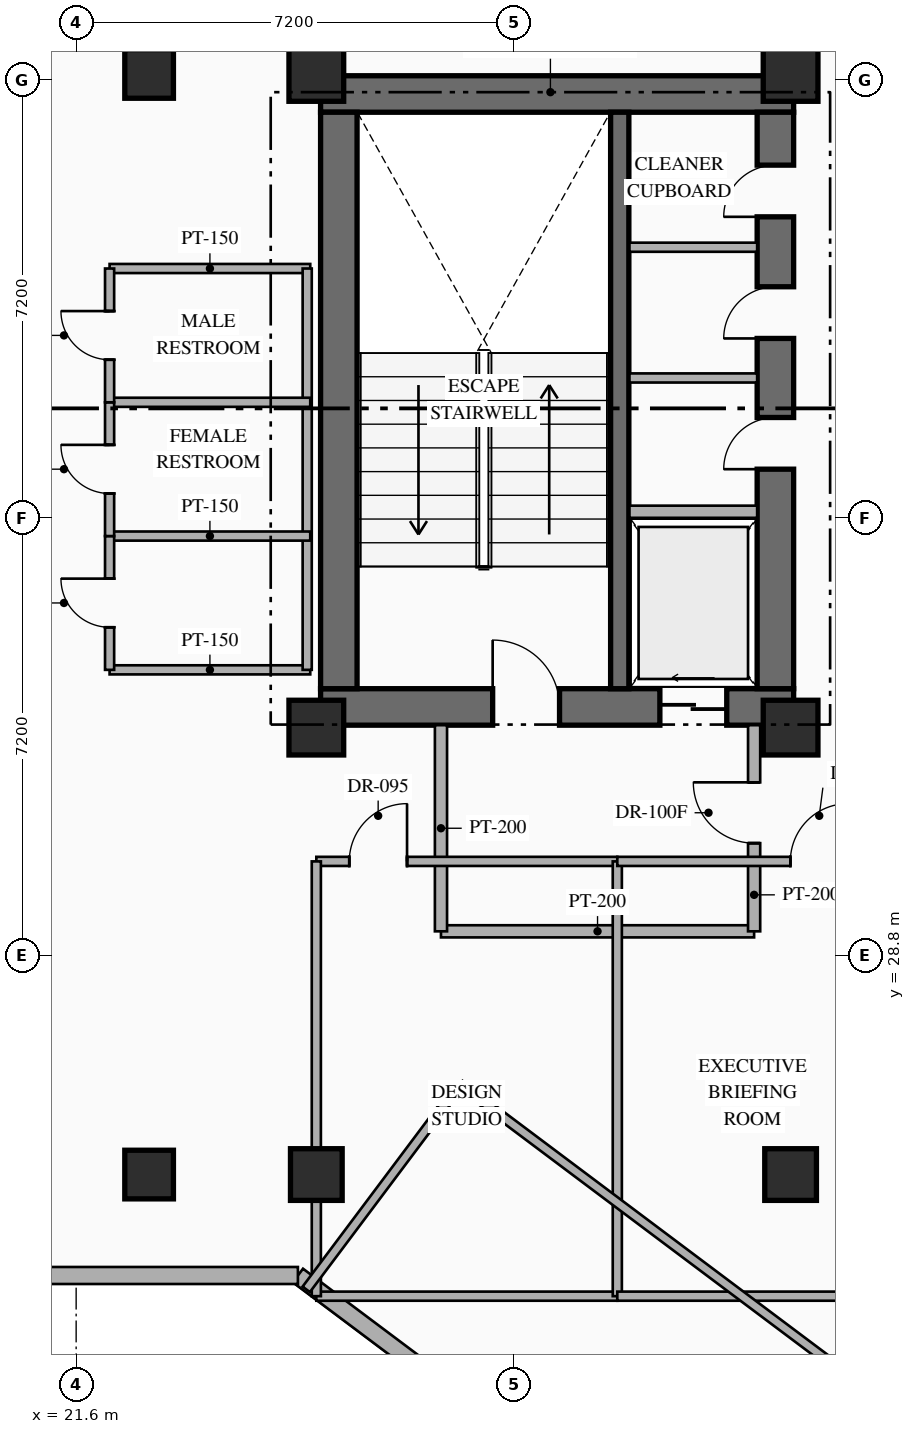
"""IFC4 building model, lengths in metres.
Left out: names, types, materials, properties, quantities, classifications, styles, units other than length and angle.
Written with IfcOpenShell. Run it as: python <this file> out.ifc"""

import sys

from ifc_helpers import new_model, si_unit, direction, frame, frame_2d, origin, origin_2d, place, context, subcontext, project, spatial, rectangle, hollow_rectangle, extrude, element, fill, save


model = new_model("IFC4")
c1 = context("Model", 3, precision=1e-05, world=origin(), true_north=direction((0.0, 1.0)))
c2 = subcontext(c1, "Body", "Model", "MODEL_VIEW")
j1 = project(units=[si_unit("LENGTHUNIT", "METRE"), si_unit("PLANEANGLEUNIT", "RADIAN")], contexts=[c1])
p1 = place(None, origin())
s1 = spatial("IfcSite", under=j1, at=p1, CompositionType="ELEMENT")
p2 = place(p1, origin())
s2 = spatial("IfcBuilding", under=s1, at=p2, CompositionType="ELEMENT")
p3 = place(p2, frame((0.0, 0.0, 160.05)))
s3 = spatial("IfcBuildingStorey", under=s2, at=p3, CompositionType="ELEMENT", Elevation=160.05)
p4 = place(p3, frame((25.62, 32.89, 0.0), z_axis=(0.0, 0.0, 1.0), x_axis=(1.0, 0.0, 0.0)))
e1 = element("IfcWall", 1, at=p4, inside=s3, PredefinedType="SHEAR", context=c2, shape_type="SweptSolid", body=[
    extrude(rectangle(XDim=7.78, YDim=0.6, at=frame_2d((3.89, 0.0))), origin(), (0.0, 0.0, 1.0), 3.6),
])
p5 = place(p4, frame((2.83, 0.0, 0.0)))
e2 = element("IfcOpeningElement", 2, at=p5, cuts=e1, PredefinedType="OPENING", context=c2, shape_type="SweptSolid", body=[
    extrude(rectangle(XDim=1.1, YDim=2.2, at=frame_2d((0.55, 1.1))), frame((0.0, 0.31, 0.0), z_axis=(0.0, -1.0, 0.0), x_axis=(1.0, 0.0, 0.0)), (0.0, 0.0, 1.0), 0.62),
])
p6 = place(p4, frame((5.58, 0.0, 0.0)))
e3 = element("IfcOpeningElement", 3, at=p6, cuts=e1, PredefinedType="OPENING", context=c2, shape_type="SweptSolid", body=[
    extrude(rectangle(XDim=1.1, YDim=2.15, at=frame_2d((0.55, 1.075))), frame((0.0, 0.31, 0.0), z_axis=(0.0, -1.0, 0.0), x_axis=(1.0, 0.0, 0.0)), (0.0, 0.0, 1.0), 0.62),
])
p7 = place(p3, frame((25.62, 42.97, 0.0), z_axis=(0.0, 0.0, 1.0), x_axis=(1.0, 0.0, 0.0)))
e4 = element("IfcWall", 4, at=p7, inside=s3, PredefinedType="SHEAR", context=c2, shape_type="SweptSolid", body=[
    extrude(rectangle(XDim=7.78, YDim=0.6, at=frame_2d((3.89, 0.0))), origin(), (0.0, 0.0, 1.0), 3.6),
])
p8 = place(p3, frame((25.92, 33.19, 0.0), z_axis=(0.0, 0.0, 1.0), x_axis=(0.0, 1.0, 0.0)))
e5 = element("IfcWall", 5, at=p8, inside=s3, PredefinedType="SHEAR", context=c2, shape_type="SweptSolid", body=[
    extrude(rectangle(XDim=9.48, YDim=0.6, at=frame_2d((4.74, 0.0))), origin(), (0.0, 0.0, 1.0), 3.6),
])
p9 = place(p3, frame((33.1, 33.19, 0.0), z_axis=(0.0, 0.0, 1.0), x_axis=(0.0, 1.0, 0.0)))
e6 = element("IfcWall", 6, at=p9, inside=s3, PredefinedType="SHEAR", context=c2, shape_type="SweptSolid", body=[
    extrude(rectangle(XDim=9.48, YDim=0.6, at=frame_2d((4.74, 0.0))), origin(), (0.0, 0.0, 1.0), 3.6),
])
p10 = place(p9, frame((3.61, 0.0, 0.0)))
e7 = element("IfcOpeningElement", 7, at=p10, cuts=e6, PredefinedType="OPENING", context=c2, shape_type="SweptSolid", body=[
    extrude(rectangle(XDim=0.85, YDim=2.08, at=frame_2d((0.425, 1.04))), frame((0.0, 0.31, 0.0), z_axis=(0.0, -1.0, 0.0), x_axis=(1.0, 0.0, 0.0)), (0.0, 0.0, 1.0), 0.62),
])
p11 = place(p9, frame((5.76, 0.0, 0.0)))
e8 = element("IfcOpeningElement", 8, at=p11, cuts=e6, PredefinedType="OPENING", context=c2, shape_type="SweptSolid", body=[
    extrude(rectangle(XDim=0.85, YDim=2.08, at=frame_2d((0.425, 1.04))), frame((0.0, 0.31, 0.0), z_axis=(0.0, -1.0, 0.0), x_axis=(1.0, 0.0, 0.0)), (0.0, 0.0, 1.0), 0.62),
])
p12 = place(p9, frame((7.76, 0.0, 0.0)))
e9 = element("IfcOpeningElement", 9, at=p12, cuts=e6, PredefinedType="OPENING", context=c2, shape_type="SweptSolid", body=[
    extrude(rectangle(XDim=0.85, YDim=2.08, at=frame_2d((0.425, 1.04))), frame((0.0, 0.31, 0.0), z_axis=(0.0, -1.0, 0.0), x_axis=(1.0, 0.0, 0.0)), (0.0, 0.0, 1.0), 0.62),
])
p13 = place(p3, frame((30.54, 33.19, 0.0), z_axis=(0.0, 0.0, 1.0), x_axis=(0.0, 1.0, 0.0)))
e10 = element("IfcWall", 10, at=p13, inside=s3, PredefinedType="SHEAR", context=c2, shape_type="SweptSolid", body=[
    extrude(rectangle(XDim=9.48, YDim=0.3, at=frame_2d((4.74, 0.0))), origin(), (0.0, 0.0, 1.0), 3.6),
])
for number, where, z_axis, x_axis in (
    (11, (25.55, 32.55, 0.0), (0.0, 0.0, 1.0), (1.0, 0.0, 0.0)),
    (12, (33.35, 32.55, 0.0), (0.0, 0.0, 1.0), (1.0, 0.0, 0.0)),
    (13, (25.55, 43.3, 0.0), (0.0, 0.0, 1.0), (1.0, 0.0, 0.0)),
    (14, (33.35, 43.3, 0.0), (0.0, 0.0, 1.0), (1.0, 0.0, 0.0)),
):
    element("IfcColumn", number, at=place(p3, frame(where, z_axis=z_axis, x_axis=x_axis)), inside=s3, PredefinedType="COLUMN", context=c2, shape_type="SweptSolid", body=[
        extrude(rectangle(XDim=0.9, YDim=0.9, at=origin_2d()), origin(), (0.0, 0.0, 1.0), 3.6),
    ])
for number, where, z_axis, x_axis in (
    (15, (25.55, 25.2, 0.0), (0.0, 0.0, 1.0), (1.0, 0.0, 0.0)),
    (16, (33.35, 25.2, 0.0), (0.0, 0.0, 1.0), (1.0, 0.0, 0.0)),
):
    element("IfcColumn", number, at=place(p3, frame(where, z_axis=z_axis, x_axis=x_axis)), inside=s3, PredefinedType="COLUMN", context=c2, shape_type="SweptSolid", body=[
        extrude(hollow_rectangle(XDim=0.85, YDim=0.85, WallThickness=0.032, at=origin_2d()), origin(), (0.0, 0.0, 1.0), 3.6),
    ])
for number, where, z_axis, x_axis in (
    (17, (22.8, 25.2, 0.0), (0.0, 0.0, 1.0), (1.0, 0.0, 0.0)),
    (18, (22.8, 43.3, 0.0), (0.0, 0.0, 1.0), (1.0, 0.0, 0.0)),
):
    element("IfcColumn", number, at=place(p3, frame(where, z_axis=z_axis, x_axis=x_axis)), inside=s3, PredefinedType="COLUMN", context=c2, shape_type="SweptSolid", body=[
        extrude(hollow_rectangle(XDim=0.8, YDim=0.8, WallThickness=0.032, at=origin_2d()), origin(), (0.0, 0.0, 1.0), 3.6),
    ])
p14 = place(p3, frame((44.918, 8.787, 0.0), z_axis=(0.0, 0.0, 1.0), x_axis=(-0.800004765927, 0.599993645378, 0.0)))
e19 = element("IfcWall", 19, at=p14, inside=s3, PredefinedType="STANDARD", context=c2, shape_type="SweptSolid", body=[
    extrude(rectangle(XDim=24.588, YDim=0.28, at=frame_2d((12.294, 0.0))), origin(), (0.0, 0.0, 1.0), 3.35),
])
p15 = place(p3, frame((25.247, 23.54, 0.0), z_axis=(0.0, 0.0, 1.0), x_axis=(-1.0, 0.0, 0.0)))
e20 = element("IfcWall", 20, at=p15, inside=s3, PredefinedType="STANDARD", context=c2, shape_type="SweptSolid", body=[
    extrude(rectangle(XDim=6.747, YDim=0.28, at=frame_2d((3.374, 0.0))), origin(), (0.0, 0.0, 1.0), 3.35),
])
p16 = place(p3, frame((30.7, 36.1, 0.0), z_axis=(0.0, 0.0, 1.0), x_axis=(1.0, 0.0, 0.0)))
e21 = element("IfcWall", 21, at=p16, inside=s3, PredefinedType="STANDARD", context=c2, shape_type="SweptSolid", body=[
    extrude(rectangle(XDim=2.1, YDim=0.2, at=frame_2d((1.05, 0.0))), origin(), (0.0, 0.0, 1.0), 3.35),
])
for number, where, z_axis, x_axis in (
    (22, (30.7, 38.3, 0.0), (0.0, 0.0, 1.0), (1.0, 0.0, 0.0)),
    (23, (30.7, 40.45, 0.0), (0.0, 0.0, 1.0), (1.0, 0.0, 0.0)),
):
    element("IfcWall", number, at=place(p3, frame(where, z_axis=z_axis, x_axis=x_axis)), inside=s3, PredefinedType="PARTITIONING", context=c2, shape_type="SweptSolid", body=[
        extrude(rectangle(XDim=2.1, YDim=0.15, at=frame_2d((1.05, 0.0))), origin(), (0.0, 0.0, 1.0), 3.35),
    ])
p17 = place(p3, frame((27.6, 29.2, 0.0), z_axis=(0.0, 0.0, 1.0), x_axis=(1.0, 0.0, 0.0)))
e24 = element("IfcWall", 24, at=p17, inside=s3, PredefinedType="STANDARD", context=c2, shape_type="SweptSolid", body=[
    extrude(rectangle(XDim=5.15, YDim=0.2, at=frame_2d((2.575, 0.0))), origin(), (0.0, 0.0, 1.0), 3.35),
])
p18 = place(p3, frame((27.6, 29.2, 0.0), z_axis=(0.0, 0.0, 1.0), x_axis=(0.0, 1.0, 0.0)))
e25 = element("IfcWall", 25, at=p18, inside=s3, PredefinedType="STANDARD", context=c2, shape_type="SweptSolid", body=[
    extrude(rectangle(XDim=3.39, YDim=0.2, at=frame_2d((1.695, 0.0))), origin(), (0.0, 0.0, 1.0), 3.35),
])
p19 = place(p3, frame((32.75, 29.2, 0.0), z_axis=(0.0, 0.0, 1.0), x_axis=(0.0, 1.0, 0.0)))
e26 = element("IfcWall", 26, at=p19, inside=s3, PredefinedType="STANDARD", context=c2, shape_type="SweptSolid", body=[
    extrude(rectangle(XDim=3.39, YDim=0.2, at=frame_2d((1.695, 0.0))), origin(), (0.0, 0.0, 1.0), 3.35),
])
p20 = place(p19, frame((1.45, 0.0, 0.0)))
e27 = element("IfcOpeningElement", 27, at=p20, cuts=e26, PredefinedType="OPENING", context=c2, shape_type="SweptSolid", body=[
    extrude(rectangle(XDim=1.0, YDim=2.2, at=frame_2d((0.5, 1.1))), frame((0.0, 0.11, 0.0), z_axis=(0.0, -1.0, 0.0), x_axis=(1.0, 0.0, 0.0)), (0.0, 0.0, 1.0), 0.22),
])
for number, where, z_axis, x_axis in (
    (28, (22.15, 33.5, 0.0), (0.0, 0.0, 1.0), (1.0, 0.0, 0.0)),
    (29, (22.15, 40.1, 0.0), (0.0, 0.0, 1.0), (1.0, 0.0, 0.0)),
):
    element("IfcWall", number, at=place(p3, frame(where, z_axis=z_axis, x_axis=x_axis)), inside=s3, PredefinedType="PARTITIONING", context=c2, shape_type="SweptSolid", body=[
        extrude(rectangle(XDim=3.3, YDim=0.15, at=frame_2d((1.65, 0.0))), origin(), (0.0, 0.0, 1.0), 3.35),
    ])
p21 = place(p3, frame((25.4, 33.5, 0.0), z_axis=(0.0, 0.0, 1.0), x_axis=(0.0, 1.0, 0.0)))
e30 = element("IfcWall", 30, at=p21, inside=s3, PredefinedType="PARTITIONING", context=c2, shape_type="SweptSolid", body=[
    extrude(rectangle(XDim=6.6, YDim=0.15, at=frame_2d((3.3, 0.0))), origin(), (0.0, 0.0, 1.0), 3.35),
])
for number, where, z_axis, x_axis in (
    (31, (22.15, 35.7, 0.0), (0.0, 0.0, 1.0), (1.0, 0.0, 0.0)),
    (32, (22.15, 37.9, 0.0), (0.0, 0.0, 1.0), (1.0, 0.0, 0.0)),
):
    element("IfcWall", number, at=place(p3, frame(where, z_axis=z_axis, x_axis=x_axis)), inside=s3, PredefinedType="PARTITIONING", context=c2, shape_type="SweptSolid", body=[
        extrude(rectangle(XDim=3.3, YDim=0.15, at=frame_2d((1.65, 0.0))), origin(), (0.0, 0.0, 1.0), 3.35),
    ])
p22 = place(p3, frame((22.15, 33.5, 0.0), z_axis=(0.0, 0.0, 1.0), x_axis=(0.0, 1.0, 0.0)))
e33 = element("IfcWall", 33, at=p22, inside=s3, PredefinedType="PARTITIONING", context=c2, shape_type="SweptSolid", body=[
    extrude(rectangle(XDim=2.2, YDim=0.15, at=frame_2d((1.1, 0.0))), origin(), (0.0, 0.0, 1.0), 3.35),
])
p23 = place(p22, frame((0.7, 0.0, 0.0)))
e34 = element("IfcOpeningElement", 34, at=p23, cuts=e33, PredefinedType="OPENING", context=c2, shape_type="SweptSolid", body=[
    extrude(rectangle(XDim=0.8, YDim=2.06, at=frame_2d((0.4, 1.03))), frame((0.0, 0.085, 0.0), z_axis=(0.0, -1.0, 0.0), x_axis=(1.0, 0.0, 0.0)), (0.0, 0.0, 1.0), 0.17),
])
p24 = place(p3, frame((22.15, 35.7, 0.0), z_axis=(0.0, 0.0, 1.0), x_axis=(0.0, 1.0, 0.0)))
e35 = element("IfcWall", 35, at=p24, inside=s3, PredefinedType="PARTITIONING", context=c2, shape_type="SweptSolid", body=[
    extrude(rectangle(XDim=2.2, YDim=0.15, at=frame_2d((1.1, 0.0))), origin(), (0.0, 0.0, 1.0), 3.35),
])
p25 = place(p24, frame((0.7, 0.0, 0.0)))
e36 = element("IfcOpeningElement", 36, at=p25, cuts=e35, PredefinedType="OPENING", context=c2, shape_type="SweptSolid", body=[
    extrude(rectangle(XDim=0.8, YDim=2.06, at=frame_2d((0.4, 1.03))), frame((0.0, 0.085, 0.0), z_axis=(0.0, -1.0, 0.0), x_axis=(1.0, 0.0, 0.0)), (0.0, 0.0, 1.0), 0.17),
])
p26 = place(p3, frame((22.15, 37.9, 0.0), z_axis=(0.0, 0.0, 1.0), x_axis=(0.0, 1.0, 0.0)))
e37 = element("IfcWall", 37, at=p26, inside=s3, PredefinedType="PARTITIONING", context=c2, shape_type="SweptSolid", body=[
    extrude(rectangle(XDim=2.2, YDim=0.15, at=frame_2d((1.1, 0.0))), origin(), (0.0, 0.0, 1.0), 3.35),
])
p27 = place(p26, frame((0.7, 0.0, 0.0)))
e38 = element("IfcOpeningElement", 38, at=p27, cuts=e37, PredefinedType="OPENING", context=c2, shape_type="SweptSolid", body=[
    extrude(rectangle(XDim=0.8, YDim=2.06, at=frame_2d((0.4, 1.03))), frame((0.0, 0.085, 0.0), z_axis=(0.0, -1.0, 0.0), x_axis=(1.0, 0.0, 0.0)), (0.0, 0.0, 1.0), 0.17),
])
p28 = place(p3, frame((25.55, 23.2, 0.0), z_axis=(0.0, 0.0, 1.0), x_axis=(1.0, 0.0, 0.0)))
e39 = element("IfcWall", 39, at=p28, inside=s3, PredefinedType="PARTITIONING", context=c2, shape_type="SweptSolid", body=[
    extrude(rectangle(XDim=4.95, YDim=0.15, at=frame_2d((2.475, 0.0))), origin(), (0.0, 0.0, 1.0), 3.35),
])
p29 = place(p3, frame((25.55, 30.35, 0.0), z_axis=(0.0, 0.0, 1.0), x_axis=(1.0, 0.0, 0.0)))
e40 = element("IfcWall", 40, at=p29, inside=s3, PredefinedType="PARTITIONING", context=c2, shape_type="SweptSolid", body=[
    extrude(rectangle(XDim=4.95, YDim=0.15, at=frame_2d((2.475, 0.0))), origin(), (0.0, 0.0, 1.0), 3.35),
])
p30 = place(p29, frame((0.542, 0.0, 0.0)))
e41 = element("IfcOpeningElement", 41, at=p30, cuts=e40, PredefinedType="OPENING", context=c2, shape_type="SweptSolid", body=[
    extrude(rectangle(XDim=0.95, YDim=2.15, at=frame_2d((0.475, 1.075))), frame((0.0, 0.085, 0.0), z_axis=(0.0, -1.0, 0.0), x_axis=(1.0, 0.0, 0.0)), (0.0, 0.0, 1.0), 0.17),
])
p31 = place(p3, frame((25.55, 23.2, 0.0), z_axis=(0.0, 0.0, 1.0), x_axis=(0.0, 1.0, 0.0)))
e42 = element("IfcWall", 42, at=p31, inside=s3, PredefinedType="PARTITIONING", context=c2, shape_type="SweptSolid", body=[
    extrude(rectangle(XDim=7.15, YDim=0.15, at=frame_2d((3.575, 0.0))), origin(), (0.0, 0.0, 1.0), 2.695),
])
p32 = place(p3, frame((30.5, 23.2, 0.0), z_axis=(0.0, 0.0, 1.0), x_axis=(0.0, 1.0, 0.0)))
e43 = element("IfcWall", 43, at=p32, inside=s3, PredefinedType="PARTITIONING", context=c2, shape_type="SweptSolid", body=[
    extrude(rectangle(XDim=7.15, YDim=0.15, at=frame_2d((3.575, 0.0))), origin(), (0.0, 0.0, 1.0), 3.35),
])
p33 = place(p3, frame((30.5, 23.2, 0.0), z_axis=(0.0, 0.0, 1.0), x_axis=(1.0, 0.0, 0.0)))
e44 = element("IfcWall", 44, at=p33, inside=s3, PredefinedType="PARTITIONING", context=c2, shape_type="SweptSolid", body=[
    extrude(rectangle(XDim=4.45, YDim=0.15, at=frame_2d((2.225, 0.0))), origin(), (0.0, 0.0, 1.0), 3.35),
])
p34 = place(p3, frame((30.5, 30.35, 0.0), z_axis=(0.0, 0.0, 1.0), x_axis=(1.0, 0.0, 0.0)))
e45 = element("IfcWall", 45, at=p34, inside=s3, PredefinedType="PARTITIONING", context=c2, shape_type="SweptSolid", body=[
    extrude(rectangle(XDim=4.45, YDim=0.15, at=frame_2d((2.225, 0.0))), origin(), (0.0, 0.0, 1.0), 3.35),
])
p35 = place(p34, frame((2.846, 0.0, 0.0)))
e46 = element("IfcOpeningElement", 46, at=p35, cuts=e45, PredefinedType="OPENING", context=c2, shape_type="SweptSolid", body=[
    extrude(rectangle(XDim=0.95, YDim=2.15, at=frame_2d((0.475, 1.075))), frame((0.0, 0.085, 0.0), z_axis=(0.0, -1.0, 0.0), x_axis=(1.0, 0.0, 0.0)), (0.0, 0.0, 1.0), 0.17),
])
p36 = place(p3, frame((27.91, 26.68, 0.0), z_axis=(0.0, 0.0, 1.0), x_axis=(0.800005938517, -0.599992081896, 0.0)))
e47 = element("IfcWall", 47, at=p36, inside=s3, PredefinedType="PARTITIONING", context=c2, shape_type="SweptSolid", body=[
    extrude(rectangle(XDim=14.8, YDim=0.15, at=frame_2d((7.4, 0.0))), origin(), (0.0, 0.0, 1.0), 3.35),
])
p37 = place(p36, frame((9.281, 0.0, 0.0)))
e48 = element("IfcOpeningElement", 48, at=p37, cuts=e47, PredefinedType="OPENING", context=c2, shape_type="SweptSolid", body=[
    extrude(rectangle(XDim=0.95, YDim=2.15, at=frame_2d((0.475, 1.075))), frame((0.0, 0.085, 0.0), z_axis=(0.0, -1.0, 0.0), x_axis=(1.0, 0.0, 0.0)), (0.0, 0.0, 1.0), 0.17),
])
p38 = place(p3, frame((25.384, 23.312, 0.0), z_axis=(0.0, 0.0, 1.0), x_axis=(0.599990721155, 0.80000695905, 0.0)))
e49 = element("IfcWall", 49, at=p38, inside=s3, PredefinedType="PARTITIONING", context=c2, shape_type="SweptSolid", body=[
    extrude(rectangle(XDim=4.21, YDim=0.15, at=frame_2d((2.105, 0.0))), origin(), (0.0, 0.0, 1.0), 3.35),
])
p39 = place(p5, origin())
e50 = element("IfcDoor", 50, at=p39, inside=s3, OperationType="SINGLE_SWING_LEFT", PredefinedType="DOOR", context=c2, shape_type="SweptSolid", body=[
    extrude(rectangle(XDim=1.1, YDim=2.2, at=frame_2d((0.55, 1.1))), frame((0.0, 0.025, 0.0), z_axis=(0.0, -1.0, 0.0), x_axis=(1.0, 0.0, 0.0)), (0.0, 0.0, 1.0), 0.05),
])
fill(e2, e50)
p40 = place(p6, origin())
e51 = element("IfcDoor", 51, at=p40, inside=s3, OperationType="SLIDING_TO_LEFT", PredefinedType="USERDEFINED", context=c2, shape_type="SweptSolid", body=[
    extrude(rectangle(XDim=1.1, YDim=2.15, at=frame_2d((0.55, 1.075))), frame((0.0, 0.025, 0.0), z_axis=(0.0, -1.0, 0.0), x_axis=(1.0, 0.0, 0.0)), (0.0, 0.0, 1.0), 0.05),
])
fill(e3, e51)
p41 = place(p10, origin())
e52 = element("IfcDoor", 52, at=p41, inside=s3, OperationType="SINGLE_SWING_LEFT", PredefinedType="DOOR", context=c2, shape_type="SweptSolid", body=[
    extrude(rectangle(XDim=0.85, YDim=2.08, at=frame_2d((0.425, 1.04))), frame((0.0, 0.025, 0.0), z_axis=(0.0, -1.0, 0.0), x_axis=(1.0, 0.0, 0.0)), (0.0, 0.0, 1.0), 0.05),
])
fill(e7, e52)
p42 = place(p11, origin())
e53 = element("IfcDoor", 53, at=p42, inside=s3, OperationType="SINGLE_SWING_LEFT", PredefinedType="DOOR", context=c2, shape_type="SweptSolid", body=[
    extrude(rectangle(XDim=0.85, YDim=2.08, at=frame_2d((0.425, 1.04))), frame((0.0, 0.025, 0.0), z_axis=(0.0, -1.0, 0.0), x_axis=(1.0, 0.0, 0.0)), (0.0, 0.0, 1.0), 0.05),
])
fill(e8, e53)
p43 = place(p12, origin())
e54 = element("IfcDoor", 54, at=p43, inside=s3, OperationType="SINGLE_SWING_LEFT", PredefinedType="DOOR", context=c2, shape_type="SweptSolid", body=[
    extrude(rectangle(XDim=0.85, YDim=2.08, at=frame_2d((0.425, 1.04))), frame((0.0, 0.025, 0.0), z_axis=(0.0, -1.0, 0.0), x_axis=(1.0, 0.0, 0.0)), (0.0, 0.0, 1.0), 0.05),
])
fill(e9, e54)
p44 = place(p20, origin())
e55 = element("IfcDoor", 55, at=p44, inside=s3, OperationType="SINGLE_SWING_RIGHT", PredefinedType="DOOR", context=c2, shape_type="SweptSolid", body=[
    extrude(rectangle(XDim=1.0, YDim=2.2, at=frame_2d((0.5, 1.1))), frame((0.0, 0.025, 0.0), z_axis=(0.0, -1.0, 0.0), x_axis=(1.0, 0.0, 0.0)), (0.0, 0.0, 1.0), 0.05),
])
fill(e27, e55)
p45 = place(p23, origin())
e56 = element("IfcDoor", 56, at=p45, inside=s3, OperationType="SINGLE_SWING_RIGHT", PredefinedType="DOOR", context=c2, shape_type="SweptSolid", body=[
    extrude(rectangle(XDim=0.8, YDim=2.06, at=frame_2d((0.4, 1.03))), frame((0.0, 0.025, 0.0), z_axis=(0.0, -1.0, 0.0), x_axis=(1.0, 0.0, 0.0)), (0.0, 0.0, 1.0), 0.05),
])
fill(e34, e56)
p46 = place(p25, origin())
e57 = element("IfcDoor", 57, at=p46, inside=s3, OperationType="SINGLE_SWING_RIGHT", PredefinedType="DOOR", context=c2, shape_type="SweptSolid", body=[
    extrude(rectangle(XDim=0.8, YDim=2.06, at=frame_2d((0.4, 1.03))), frame((0.0, 0.025, 0.0), z_axis=(0.0, -1.0, 0.0), x_axis=(1.0, 0.0, 0.0)), (0.0, 0.0, 1.0), 0.05),
])
fill(e36, e57)
p47 = place(p27, origin())
e58 = element("IfcDoor", 58, at=p47, inside=s3, OperationType="SINGLE_SWING_RIGHT", PredefinedType="DOOR", context=c2, shape_type="SweptSolid", body=[
    extrude(rectangle(XDim=0.8, YDim=2.06, at=frame_2d((0.4, 1.03))), frame((0.0, 0.025, 0.0), z_axis=(0.0, -1.0, 0.0), x_axis=(1.0, 0.0, 0.0)), (0.0, 0.0, 1.0), 0.05),
])
fill(e38, e58)
p48 = place(p30, origin())
e59 = element("IfcDoor", 59, at=p48, inside=s3, OperationType="SINGLE_SWING_RIGHT", PredefinedType="DOOR", context=c2, shape_type="SweptSolid", body=[
    extrude(rectangle(XDim=0.95, YDim=2.15, at=frame_2d((0.475, 1.075))), frame((0.0, 0.025, 0.0), z_axis=(0.0, -1.0, 0.0), x_axis=(1.0, 0.0, 0.0)), (0.0, 0.0, 1.0), 0.05),
])
fill(e41, e59)
p49 = place(p35, origin())
e60 = element("IfcDoor", 60, at=p49, inside=s3, OperationType="SINGLE_SWING_RIGHT", PredefinedType="DOOR", context=c2, shape_type="SweptSolid", body=[
    extrude(rectangle(XDim=0.95, YDim=2.15, at=frame_2d((0.475, 1.075))), frame((0.0, 0.025, 0.0), z_axis=(0.0, -1.0, 0.0), x_axis=(1.0, 0.0, 0.0)), (0.0, 0.0, 1.0), 0.05),
])
fill(e46, e60)
save(model, sys.argv[1])
